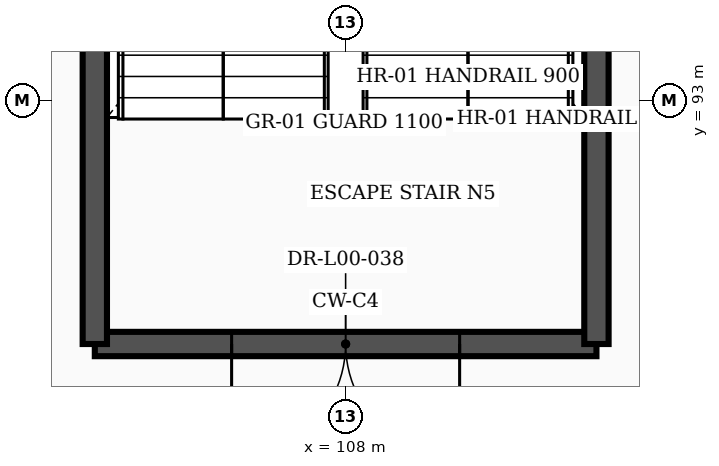
"""IFC4 building model, lengths in metres.
Left out: names, types, materials, properties, quantities, classifications, styles, units other than length and angle.
Written with IfcOpenShell. Run it as: python <this file> out.ifc"""

import sys

from ifc_helpers import new_model, si_unit, direction, frame, frame_2d, origin, place, context, subcontext, project, spatial, rectangle, extrude, element, fill, save


model = new_model("IFC4")
c1 = context("Model", 3, precision=1e-05, world=origin(), true_north=direction((0.0, 1.0)))
c2 = subcontext(c1, "Body", "Model", "MODEL_VIEW")
j1 = project(units=[si_unit("LENGTHUNIT", "METRE"), si_unit("PLANEANGLEUNIT", "RADIAN")], contexts=[c1])
p1 = place(None, origin())
s1 = spatial("IfcSite", under=j1, at=p1, CompositionType="ELEMENT")
p2 = place(p1, origin())
s2 = spatial("IfcBuilding", under=s1, at=p2, CompositionType="ELEMENT")
p3 = place(p2, origin())
s3 = spatial("IfcBuildingStorey", under=s2, at=p3, CompositionType="ELEMENT", Elevation=0.0)
p4 = place(p3, frame((104.7, 89.8, 0.0), z_axis=(0.0, 0.0, 1.0), x_axis=(1.0, 0.0, 0.0)))
e1 = element("IfcWall", 1, at=p4, inside=s3, PredefinedType="SHEAR", context=c2, shape_type="SweptSolid", body=[
    extrude(rectangle(XDim=6.6, YDim=0.32, at=frame_2d((3.3, 0.0))), origin(), (0.0, 0.0, 1.0), 5.75),
])
p5 = place(p4, frame((1.8, 0.0, 0.0)))
e2 = element("IfcOpeningElement", 2, at=p5, cuts=e1, PredefinedType="OPENING", context=c2, shape_type="SweptSolid", body=[
    extrude(rectangle(XDim=3.0, YDim=2.25, at=frame_2d((1.5, 1.125))), frame((0.0, 0.172, 0.0), z_axis=(0.0, -1.0, 0.0), x_axis=(1.0, 0.0, 0.0)), (0.0, 0.0, 1.0), 0.344),
])
for number, where, z_axis, x_axis in (
    (3, (104.7, 89.8, 0.0), (0.0, 0.0, 1.0), (0.0, 1.0, 0.0)),
    (4, (111.3, 89.8, 0.0), (0.0, 0.0, 1.0), (0.0, 1.0, 0.0)),
):
    element("IfcWall", number, at=place(p3, frame(where, z_axis=z_axis, x_axis=x_axis)), inside=s3, PredefinedType="SHEAR", context=c2, shape_type="SweptSolid", body=[
        extrude(rectangle(XDim=11.0, YDim=0.32, at=frame_2d((5.5, 0.0))), origin(), (0.0, 0.0, 1.0), 5.75),
    ])
p6 = place(p5, frame((3.0, 0.0, 0.0), z_axis=(0.0, 0.0, 1.0), x_axis=(-1.0, 0.0, 0.0)))
e5 = element("IfcDoor", 5, at=p6, inside=s3, OperationType="DOUBLE_DOOR_SINGLE_SWING", PredefinedType="DOOR", context=c2, shape_type="SweptSolid", body=[
    extrude(rectangle(XDim=3.0, YDim=2.25, at=frame_2d((1.5, 1.125))), frame((0.0, 0.025, 0.0), z_axis=(0.0, -1.0, 0.0), x_axis=(1.0, 0.0, 0.0)), (0.0, 0.0, 1.0), 0.05),
])
fill(e2, e5)
save(model, sys.argv[1])
